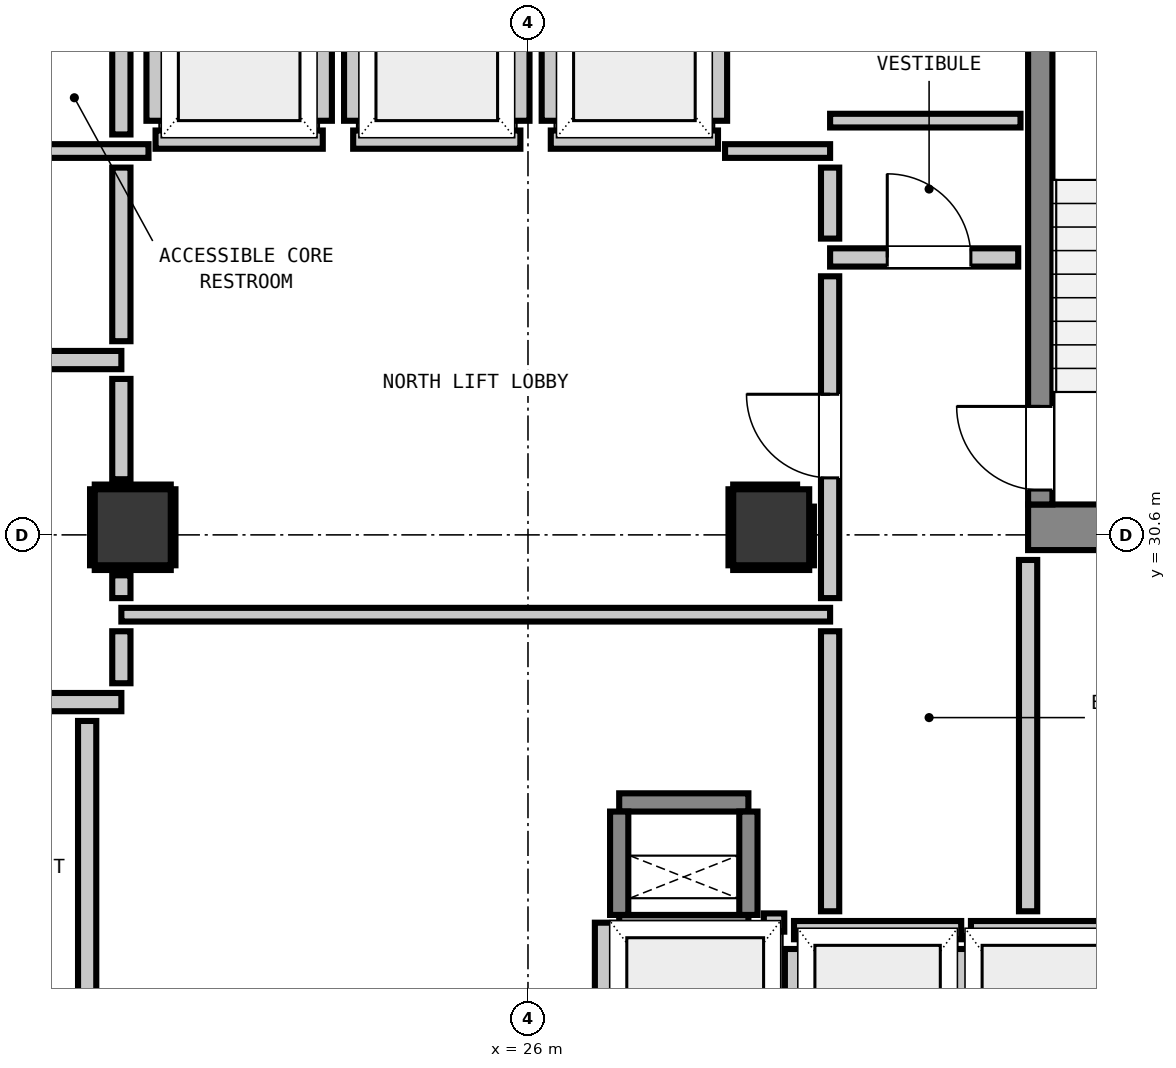
"""IFC4 building model, lengths in metres.
Left out: names, types, materials, properties, quantities, classifications, styles, units other than length and angle.
Written with IfcOpenShell. Run it as: python <this file> out.ifc"""

import sys

from ifc_helpers import new_model, si_unit, direction, frame, frame_2d, origin, origin_2d, place, context, subcontext, project, spatial, rectangle, extrude, element, fill, save


model = new_model("IFC4")
c1 = context("Model", 3, precision=1e-05, world=origin(), true_north=direction((0.0, 1.0)))
c2 = subcontext(c1, "Body", "Model", "MODEL_VIEW")
j1 = project(units=[si_unit("LENGTHUNIT", "METRE"), si_unit("PLANEANGLEUNIT", "RADIAN")], contexts=[c1])
p1 = place(None, origin())
s1 = spatial("IfcSite", under=j1, at=p1, CompositionType="ELEMENT")
p2 = place(p1, origin())
s2 = spatial("IfcBuilding", under=s1, at=p2, CompositionType="ELEMENT")
p3 = place(p2, frame((0.0, 0.0, 75.12)))
s3 = spatial("IfcBuildingStorey", under=s2, at=p3, CompositionType="ELEMENT", Elevation=75.12)
p4 = place(p3, frame((32.58, 30.7, 0.0), z_axis=(0.0, 0.0, 1.0), x_axis=(1.0, 0.0, 0.0)))
e1 = element("IfcWall", 1, at=p4, inside=s3, PredefinedType="SHEAR", context=c2, shape_type="SweptSolid", body=[
    extrude(rectangle(XDim=3.415, YDim=0.6, at=frame_2d((1.708, 0.0))), origin(), (0.0, 0.0, 1.0), 3.32),
])
p5 = place(p3, frame((32.74, 31.0, 0.0), z_axis=(0.0, 0.0, 1.0), x_axis=(0.0, 1.0, 0.0)))
e2 = element("IfcWall", 2, at=p5, inside=s3, PredefinedType="SHEAR", context=c2, shape_type="SweptSolid", body=[
    extrude(rectangle(XDim=7.8, YDim=0.32, at=frame_2d((3.9, 0.0))), origin(), (0.0, 0.0, 1.0), 3.32),
])
p6 = place(p5, frame((0.19, 0.0, 0.0)))
e3 = element("IfcOpeningElement", 3, at=p6, cuts=e2, PredefinedType="OPENING", context=c2, shape_type="SweptSolid", body=[
    extrude(rectangle(XDim=1.1, YDim=2.15, at=frame_2d((0.55, 1.075))), frame((0.0, 0.17, 0.0), z_axis=(0.0, -1.0, 0.0), x_axis=(1.0, 0.0, 0.0)), (0.0, 0.0, 1.0), 0.34),
])
for number, where, z_axis, x_axis in (
    (4, (27.2, 25.48, 0.0), (0.0, 0.0, 1.0), (1.0, 0.0, 0.0)),
    (5, (27.2, 27.08, 0.0), (0.0, 0.0, 1.0), (1.0, 0.0, 0.0)),
):
    element("IfcWall", number, at=place(p3, frame(where, z_axis=z_axis, x_axis=x_axis)), inside=s3, PredefinedType="SHEAR", context=c2, shape_type="SweptSolid", body=[
        extrude(rectangle(XDim=1.7, YDim=0.24, at=frame_2d((0.85, 0.0))), origin(), (0.0, 0.0, 1.0), 3.32),
    ])
for number, where, z_axis, x_axis in (
    (6, (27.2, 25.6, 0.0), (0.0, 0.0, 1.0), (0.0, 1.0, 0.0)),
    (7, (28.9, 25.6, 0.0), (0.0, 0.0, 1.0), (0.0, 1.0, 0.0)),
):
    element("IfcWall", number, at=place(p3, frame(where, z_axis=z_axis, x_axis=x_axis)), inside=s3, PredefinedType="SHEAR", context=c2, shape_type="SweptSolid", body=[
        extrude(rectangle(XDim=1.36, YDim=0.24, at=frame_2d((0.68, 0.0))), origin(), (0.0, 0.0, 1.0), 3.32),
    ])
for number, where, z_axis, x_axis in (
    (8, (20.8, 30.7, 0.0), (0.0, 0.0, 1.0), (1.0, 0.0, 0.0)),
    (9, (29.2, 30.7, 0.0), (0.0, 0.0, 1.0), (1.0, 0.0, 0.0)),
):
    element("IfcColumn", number, at=place(p3, frame(where, z_axis=z_axis, x_axis=x_axis)), inside=s3, PredefinedType="COLUMN", context=c2, shape_type="SweptSolid", body=[
        extrude(rectangle(XDim=1.0, YDim=1.0, at=origin_2d()), origin(), (0.0, 0.0, 1.0), 3.32),
    ])
p7 = place(p3, frame((21.1, 35.8, 0.0), z_axis=(0.0, 0.0, 1.0), x_axis=(1.0, 0.0, 0.0)))
e10 = element("IfcWall", 10, at=p7, inside=s3, PredefinedType="PARTITIONING", context=c2, shape_type="SweptSolid", body=[
    extrude(rectangle(XDim=2.2, YDim=0.24, at=frame_2d((1.1, 0.0))), origin(), (0.0, 0.0, 1.0), 3.06),
])
p8 = place(p3, frame((21.1, 36.048, 0.0), z_axis=(0.0, 0.0, 1.0), x_axis=(0.0, 1.0, 0.0)))
e11 = element("IfcWall", 11, at=p8, inside=s3, PredefinedType="PARTITIONING", context=c2, shape_type="SweptSolid", body=[
    extrude(rectangle(XDim=2.104, YDim=0.24, at=frame_2d((1.052, 0.0))), origin(), (0.0, 0.0, 1.0), 2.295),
])
p9 = place(p3, frame((23.3, 36.048, 0.0), z_axis=(0.0, 0.0, 1.0), x_axis=(0.0, 1.0, 0.0)))
e12 = element("IfcWall", 12, at=p9, inside=s3, PredefinedType="PARTITIONING", context=c2, shape_type="SweptSolid", body=[
    extrude(rectangle(XDim=2.104, YDim=0.24, at=frame_2d((1.052, 0.0))), origin(), (0.0, 0.0, 1.0), 3.06),
])
p10 = place(p3, frame((23.7, 35.8, 0.0), z_axis=(0.0, 0.0, 1.0), x_axis=(1.0, 0.0, 0.0)))
e13 = element("IfcWall", 13, at=p10, inside=s3, PredefinedType="PARTITIONING", context=c2, shape_type="SweptSolid", body=[
    extrude(rectangle(XDim=2.2, YDim=0.24, at=frame_2d((1.1, 0.0))), origin(), (0.0, 0.0, 1.0), 3.06),
])
for number, where, z_axis, x_axis in (
    (14, (23.7, 36.048, 0.0), (0.0, 0.0, 1.0), (0.0, 1.0, 0.0)),
    (15, (25.9, 36.048, 0.0), (0.0, 0.0, 1.0), (0.0, 1.0, 0.0)),
):
    element("IfcWall", number, at=place(p3, frame(where, z_axis=z_axis, x_axis=x_axis)), inside=s3, PredefinedType="PARTITIONING", context=c2, shape_type="SweptSolid", body=[
        extrude(rectangle(XDim=2.104, YDim=0.24, at=frame_2d((1.052, 0.0))), origin(), (0.0, 0.0, 1.0), 3.06),
    ])
p11 = place(p3, frame((26.3, 35.8, 0.0), z_axis=(0.0, 0.0, 1.0), x_axis=(1.0, 0.0, 0.0)))
e16 = element("IfcWall", 16, at=p11, inside=s3, PredefinedType="PARTITIONING", context=c2, shape_type="SweptSolid", body=[
    extrude(rectangle(XDim=2.2, YDim=0.24, at=frame_2d((1.1, 0.0))), origin(), (0.0, 0.0, 1.0), 3.06),
])
for number, where, z_axis, x_axis in (
    (17, (26.3, 36.048, 0.0), (0.0, 0.0, 1.0), (0.0, 1.0, 0.0)),
    (18, (28.5, 36.048, 0.0), (0.0, 0.0, 1.0), (0.0, 1.0, 0.0)),
):
    element("IfcWall", number, at=place(p3, frame(where, z_axis=z_axis, x_axis=x_axis)), inside=s3, PredefinedType="PARTITIONING", context=c2, shape_type="SweptSolid", body=[
        extrude(rectangle(XDim=2.104, YDim=0.24, at=frame_2d((1.052, 0.0))), origin(), (0.0, 0.0, 1.0), 3.06),
    ])
p12 = place(p3, frame((29.5, 25.4, 0.0), z_axis=(0.0, 0.0, 1.0), x_axis=(1.0, 0.0, 0.0)))
e19 = element("IfcWall", 19, at=p12, inside=s3, PredefinedType="PARTITIONING", context=c2, shape_type="SweptSolid", body=[
    extrude(rectangle(XDim=2.2, YDim=0.24, at=frame_2d((1.1, 0.0))), origin(), (0.0, 0.0, 1.0), 3.06),
])
p13 = place(p3, frame((29.5, 22.632, 0.0), z_axis=(0.0, 0.0, 1.0), x_axis=(0.0, 1.0, 0.0)))
e20 = element("IfcWall", 20, at=p13, inside=s3, PredefinedType="PARTITIONING", context=c2, shape_type="SweptSolid", body=[
    extrude(rectangle(XDim=2.52, YDim=0.24, at=frame_2d((1.26, 0.0))), origin(), (0.0, 0.0, 1.0), 2.295),
])
p14 = place(p3, frame((31.7, 22.73, 0.0), z_axis=(0.0, 0.0, 1.0), x_axis=(0.0, 1.0, 0.0)))
e21 = element("IfcWall", 21, at=p14, inside=s3, PredefinedType="PARTITIONING", context=c2, shape_type="SweptSolid", body=[
    extrude(rectangle(XDim=2.422, YDim=0.24, at=frame_2d((1.211, 0.0))), origin(), (0.0, 0.0, 1.0), 3.06),
])
p15 = place(p3, frame((31.828, 25.4, 0.0), z_axis=(0.0, 0.0, 1.0), x_axis=(1.0, 0.0, 0.0)))
e22 = element("IfcWall", 22, at=p15, inside=s3, PredefinedType="PARTITIONING", context=c2, shape_type="SweptSolid", body=[
    extrude(rectangle(XDim=2.072, YDim=0.24, at=frame_2d((1.036, 0.0))), origin(), (0.0, 0.0, 1.0), 3.06),
])
p16 = place(p3, frame((29.103, 25.5, 0.0), z_axis=(0.0, 0.0, 1.0), x_axis=(1.0, 0.0, 0.0)))
e23 = element("IfcWall", 23, at=p16, inside=s3, PredefinedType="PARTITIONING", context=c2, shape_type="SweptSolid", body=[
    extrude(rectangle(XDim=0.269, YDim=0.24, at=frame_2d((0.135, 0.0))), origin(), (0.0, 0.0, 1.0), 3.06),
])
p17 = place(p3, frame((27.0, 22.73, 0.0), z_axis=(0.0, 0.0, 1.0), x_axis=(0.0, 1.0, 0.0)))
e24 = element("IfcWall", 24, at=p17, inside=s3, PredefinedType="PARTITIONING", context=c2, shape_type="SweptSolid", body=[
    extrude(rectangle(XDim=2.768, YDim=0.24, at=frame_2d((1.384, 0.0))), origin(), (0.0, 0.0, 1.0), 3.06),
])
p18 = place(p3, frame((17.45, 28.4, 0.0), z_axis=(0.0, 0.0, 1.0), x_axis=(1.0, 0.0, 0.0)))
e25 = element("IfcWall", 25, at=p18, inside=s3, PredefinedType="PARTITIONING", context=c2, shape_type="SweptSolid", body=[
    extrude(rectangle(XDim=3.2, YDim=0.24, at=frame_2d((1.6, 0.0))), origin(), (0.0, 0.0, 1.0), 3.06),
])
p19 = place(p18, frame((0.784, 0.0, 0.0)))
e26 = element("IfcOpeningElement", 26, at=p19, cuts=e25, PredefinedType="OPENING", context=c2, shape_type="SweptSolid", body=[
    extrude(rectangle(XDim=1.1, YDim=2.15, at=frame_2d((0.55, 1.075))), frame((0.0, 0.13, 0.0), z_axis=(0.0, -1.0, 0.0), x_axis=(1.0, 0.0, 0.0)), (0.0, 0.0, 1.0), 0.26),
])
p20 = place(p3, frame((17.45, 32.9, 0.0), z_axis=(0.0, 0.0, 1.0), x_axis=(1.0, 0.0, 0.0)))
e27 = element("IfcWall", 27, at=p20, inside=s3, PredefinedType="PARTITIONING", context=c2, shape_type="SweptSolid", body=[
    extrude(rectangle(XDim=3.2, YDim=0.24, at=frame_2d((1.6, 0.0))), origin(), (0.0, 0.0, 1.0), 3.06),
])
p21 = place(p20, frame((0.159, 0.0, 0.0)))
e28 = element("IfcOpeningElement", 28, at=p21, cuts=e27, PredefinedType="OPENING", context=c2, shape_type="SweptSolid", body=[
    extrude(rectangle(XDim=1.1, YDim=2.15, at=frame_2d((0.55, 1.075))), frame((0.0, 0.13, 0.0), z_axis=(0.0, -1.0, 0.0), x_axis=(1.0, 0.0, 0.0)), (0.0, 0.0, 1.0), 0.26),
])
p22 = place(p3, frame((29.975, 34.25, 0.0), z_axis=(0.0, 0.0, 1.0), x_axis=(1.0, 0.0, 0.0)))
e29 = element("IfcWall", 29, at=p22, inside=s3, PredefinedType="PARTITIONING", context=c2, shape_type="SweptSolid", body=[
    extrude(rectangle(XDim=2.475, YDim=0.24, at=frame_2d((1.237, 0.0))), origin(), (0.0, 0.0, 1.0), 3.06),
])
p23 = place(p22, frame((0.752, 0.0, 0.0)))
e30 = element("IfcOpeningElement", 30, at=p23, cuts=e29, PredefinedType="OPENING", context=c2, shape_type="SweptSolid", body=[
    extrude(rectangle(XDim=1.1, YDim=2.15, at=frame_2d((0.55, 1.075))), frame((0.0, 0.13, 0.0), z_axis=(0.0, -1.0, 0.0), x_axis=(1.0, 0.0, 0.0)), (0.0, 0.0, 1.0), 0.26),
])
p24 = place(p3, frame((20.65, 29.55, 0.0), z_axis=(0.0, 0.0, 1.0), x_axis=(1.0, 0.0, 0.0)))
e31 = element("IfcWall", 31, at=p24, inside=s3, PredefinedType="PARTITIONING", context=c2, shape_type="SweptSolid", body=[
    extrude(rectangle(XDim=9.325, YDim=0.18, at=frame_2d((4.663, 0.0))), origin(), (0.0, 0.0, 1.0), 3.06),
])
p25 = place(p3, frame((18.95, 35.65, 0.0), z_axis=(0.0, 0.0, 1.0), x_axis=(1.0, 0.0, 0.0)))
e32 = element("IfcWall", 32, at=p25, inside=s3, PredefinedType="PARTITIONING", context=c2, shape_type="SweptSolid", body=[
    extrude(rectangle(XDim=2.057, YDim=0.18, at=frame_2d((1.029, 0.0))), origin(), (0.0, 0.0, 1.0), 3.06),
])
p26 = place(p3, frame((28.593, 35.65, 0.0), z_axis=(0.0, 0.0, 1.0), x_axis=(1.0, 0.0, 0.0)))
e33 = element("IfcWall", 33, at=p26, inside=s3, PredefinedType="PARTITIONING", context=c2, shape_type="SweptSolid", body=[
    extrude(rectangle(XDim=1.382, YDim=0.18, at=frame_2d((0.691, 0.0))), origin(), (0.0, 0.0, 1.0), 3.06),
])
p27 = place(p3, frame((29.975, 36.05, 0.0), z_axis=(0.0, 0.0, 1.0), x_axis=(1.0, 0.0, 0.0)))
e34 = element("IfcWall", 34, at=p27, inside=s3, PredefinedType="PARTITIONING", context=c2, shape_type="SweptSolid", body=[
    extrude(rectangle(XDim=2.505, YDim=0.18, at=frame_2d((1.252, 0.0))), origin(), (0.0, 0.0, 1.0), 3.06),
])
p28 = place(p3, frame((20.2, 22.586, 0.0), z_axis=(0.0, 0.0, 1.0), x_axis=(0.0, 1.0, 0.0)))
e35 = element("IfcWall", 35, at=p28, inside=s3, PredefinedType="PARTITIONING", context=c2, shape_type="SweptSolid", body=[
    extrude(rectangle(XDim=5.566, YDim=0.24, at=frame_2d((2.783, 0.0))), origin(), (0.0, 0.0, 1.0), 3.06),
])
p29 = place(p3, frame((20.65, 28.648, 0.0), z_axis=(0.0, 0.0, 1.0), x_axis=(0.0, 1.0, 0.0)))
e36 = element("IfcWall", 36, at=p29, inside=s3, PredefinedType="PARTITIONING", context=c2, shape_type="SweptSolid", body=[
    extrude(rectangle(XDim=0.684, YDim=0.24, at=frame_2d((0.342, 0.0))), origin(), (0.0, 0.0, 1.0), 2.295),
])
p30 = place(p3, frame((20.65, 29.768, 0.0), z_axis=(0.0, 0.0, 1.0), x_axis=(0.0, 1.0, 0.0)))
e37 = element("IfcWall", 37, at=p30, inside=s3, PredefinedType="PARTITIONING", context=c2, shape_type="SweptSolid", body=[
    extrude(rectangle(XDim=0.3, YDim=0.24, at=frame_2d((0.15, 0.0))), origin(), (0.0, 0.0, 1.0), 2.295),
])
p31 = place(p3, frame((20.65, 31.332, 0.0), z_axis=(0.0, 0.0, 1.0), x_axis=(0.0, 1.0, 0.0)))
e38 = element("IfcWall", 38, at=p31, inside=s3, PredefinedType="PARTITIONING", context=c2, shape_type="SweptSolid", body=[
    extrude(rectangle(XDim=1.32, YDim=0.24, at=frame_2d((0.66, 0.0))), origin(), (0.0, 0.0, 1.0), 2.295),
])
p32 = place(p3, frame((20.65, 33.148, 0.0), z_axis=(0.0, 0.0, 1.0), x_axis=(0.0, 1.0, 0.0)))
e39 = element("IfcWall", 39, at=p32, inside=s3, PredefinedType="PARTITIONING", context=c2, shape_type="SweptSolid", body=[
    extrude(rectangle(XDim=2.284, YDim=0.24, at=frame_2d((1.142, 0.0))), origin(), (0.0, 0.0, 1.0), 2.295),
])
p33 = place(p3, frame((20.65, 35.868, 0.0), z_axis=(0.0, 0.0, 1.0), x_axis=(0.0, 1.0, 0.0)))
e40 = element("IfcWall", 40, at=p33, inside=s3, PredefinedType="PARTITIONING", context=c2, shape_type="SweptSolid", body=[
    extrude(rectangle(XDim=2.684, YDim=0.24, at=frame_2d((1.342, 0.0))), origin(), (0.0, 0.0, 1.0), 2.295),
])
p34 = place(p3, frame((29.975, 25.648, 0.0), z_axis=(0.0, 0.0, 1.0), x_axis=(0.0, 1.0, 0.0)))
e41 = element("IfcWall", 41, at=p34, inside=s3, PredefinedType="PARTITIONING", context=c2, shape_type="SweptSolid", body=[
    extrude(rectangle(XDim=3.684, YDim=0.24, at=frame_2d((1.842, 0.0))), origin(), (0.0, 0.0, 1.0), 3.06),
])
p35 = place(p3, frame((29.975, 29.768, 0.0), z_axis=(0.0, 0.0, 1.0), x_axis=(0.0, 1.0, 0.0)))
e42 = element("IfcWall", 42, at=p35, inside=s3, PredefinedType="PARTITIONING", context=c2, shape_type="SweptSolid", body=[
    extrude(rectangle(XDim=4.234, YDim=0.24, at=frame_2d((2.117, 0.0))), origin(), (0.0, 0.0, 1.0), 3.06),
])
p36 = place(p35, frame((1.582, 0.0, 0.0)))
e43 = element("IfcOpeningElement", 43, at=p36, cuts=e42, PredefinedType="OPENING", context=c2, shape_type="SweptSolid", body=[
    extrude(rectangle(XDim=1.1, YDim=2.15, at=frame_2d((0.55, 1.075))), frame((0.0, 0.13, 0.0), z_axis=(0.0, -1.0, 0.0), x_axis=(1.0, 0.0, 0.0)), (0.0, 0.0, 1.0), 0.26),
])
p37 = place(p3, frame((29.975, 34.498, 0.0), z_axis=(0.0, 0.0, 1.0), x_axis=(0.0, 1.0, 0.0)))
e44 = element("IfcWall", 44, at=p37, inside=s3, PredefinedType="PARTITIONING", context=c2, shape_type="SweptSolid", body=[
    extrude(rectangle(XDim=0.934, YDim=0.24, at=frame_2d((0.467, 0.0))), origin(), (0.0, 0.0, 1.0), 3.06),
])
p38 = place(p3, frame((32.58, 25.648, 0.0), z_axis=(0.0, 0.0, 1.0), x_axis=(0.0, 1.0, 0.0)))
e45 = element("IfcWall", 45, at=p38, inside=s3, PredefinedType="PARTITIONING", context=c2, shape_type="SweptSolid", body=[
    extrude(rectangle(XDim=4.622, YDim=0.24, at=frame_2d((2.311, 0.0))), origin(), (0.0, 0.0, 1.0), 3.06),
])
for number, where, z_axis, x_axis in (
    (46, (20.3, 30.168, 0.0), (0.0, 0.0, 1.0), (1.0, 0.0, 0.0)),
    (47, (20.3, 31.232, 0.0), (0.0, 0.0, 1.0), (1.0, 0.0, 0.0)),
    (48, (20.268, 30.2, 0.0), (0.0, 0.0, 1.0), (0.0, 1.0, 0.0)),
    (49, (21.332, 30.2, 0.0), (0.0, 0.0, 1.0), (0.0, 1.0, 0.0)),
    (50, (28.7, 30.168, 0.0), (0.0, 0.0, 1.0), (1.0, 0.0, 0.0)),
):
    element("IfcWall", number, at=place(p3, frame(where, z_axis=z_axis, x_axis=x_axis)), inside=s3, PredefinedType="PARTITIONING", context=c2, shape_type="SweptSolid", body=[
        extrude(rectangle(XDim=1.0, YDim=0.06, at=frame_2d((0.5, 0.0))), origin(), (0.0, 0.0, 1.0), 1.45),
    ])
p39 = place(p3, frame((28.7, 31.232, 0.0), z_axis=(0.0, 0.0, 1.0), x_axis=(1.0, 0.0, 0.0)))
e51 = element("IfcWall", 51, at=p39, inside=s3, PredefinedType="PARTITIONING", context=c2, shape_type="SweptSolid", body=[
    extrude(rectangle(XDim=0.841, YDim=0.06, at=frame_2d((0.42, 0.0))), origin(), (0.0, 0.0, 1.0), 1.45),
])
p40 = place(p3, frame((28.668, 30.2, 0.0), z_axis=(0.0, 0.0, 1.0), x_axis=(0.0, 1.0, 0.0)))
e52 = element("IfcWall", 52, at=p40, inside=s3, PredefinedType="PARTITIONING", context=c2, shape_type="SweptSolid", body=[
    extrude(rectangle(XDim=1.0, YDim=0.06, at=frame_2d((0.5, 0.0))), origin(), (0.0, 0.0, 1.0), 1.45),
])
p41 = place(p3, frame((29.732, 30.2, 0.0), z_axis=(0.0, 0.0, 1.0), x_axis=(0.0, 1.0, 0.0)))
e53 = element("IfcWall", 53, at=p41, inside=s3, PredefinedType="PARTITIONING", context=c2, shape_type="SweptSolid", body=[
    extrude(rectangle(XDim=0.772, YDim=0.06, at=frame_2d((0.386, 0.0))), origin(), (0.0, 0.0, 1.0), 1.45),
])
p42 = place(p6, origin())
e54 = element("IfcDoor", 54, at=p42, inside=s3, OperationType="SINGLE_SWING_RIGHT", PredefinedType="DOOR", context=c2, shape_type="SweptSolid", body=[
    extrude(rectangle(XDim=1.1, YDim=2.15, at=frame_2d((0.55, 1.075))), frame((0.0, 0.025, 0.0), z_axis=(0.0, -1.0, 0.0), x_axis=(1.0, 0.0, 0.0)), (0.0, 0.0, 1.0), 0.05),
])
fill(e3, e54)
p43 = place(p36, origin())
e55 = element("IfcDoor", 55, at=p43, inside=s3, OperationType="SINGLE_SWING_RIGHT", PredefinedType="DOOR", context=c2, shape_type="SweptSolid", body=[
    extrude(rectangle(XDim=1.1, YDim=2.15, at=frame_2d((0.55, 1.075))), frame((0.0, 0.025, 0.0), z_axis=(0.0, -1.0, 0.0), x_axis=(1.0, 0.0, 0.0)), (0.0, 0.0, 1.0), 0.05),
])
fill(e43, e55)
p44 = place(p23, origin())
e56 = element("IfcDoor", 56, at=p44, inside=s3, OperationType="SINGLE_SWING_LEFT", PredefinedType="DOOR", context=c2, shape_type="SweptSolid", body=[
    extrude(rectangle(XDim=1.1, YDim=2.15, at=frame_2d((0.55, 1.075))), frame((0.0, 0.025, 0.0), z_axis=(0.0, -1.0, 0.0), x_axis=(1.0, 0.0, 0.0)), (0.0, 0.0, 1.0), 0.05),
])
fill(e30, e56)
save(model, sys.argv[1])
